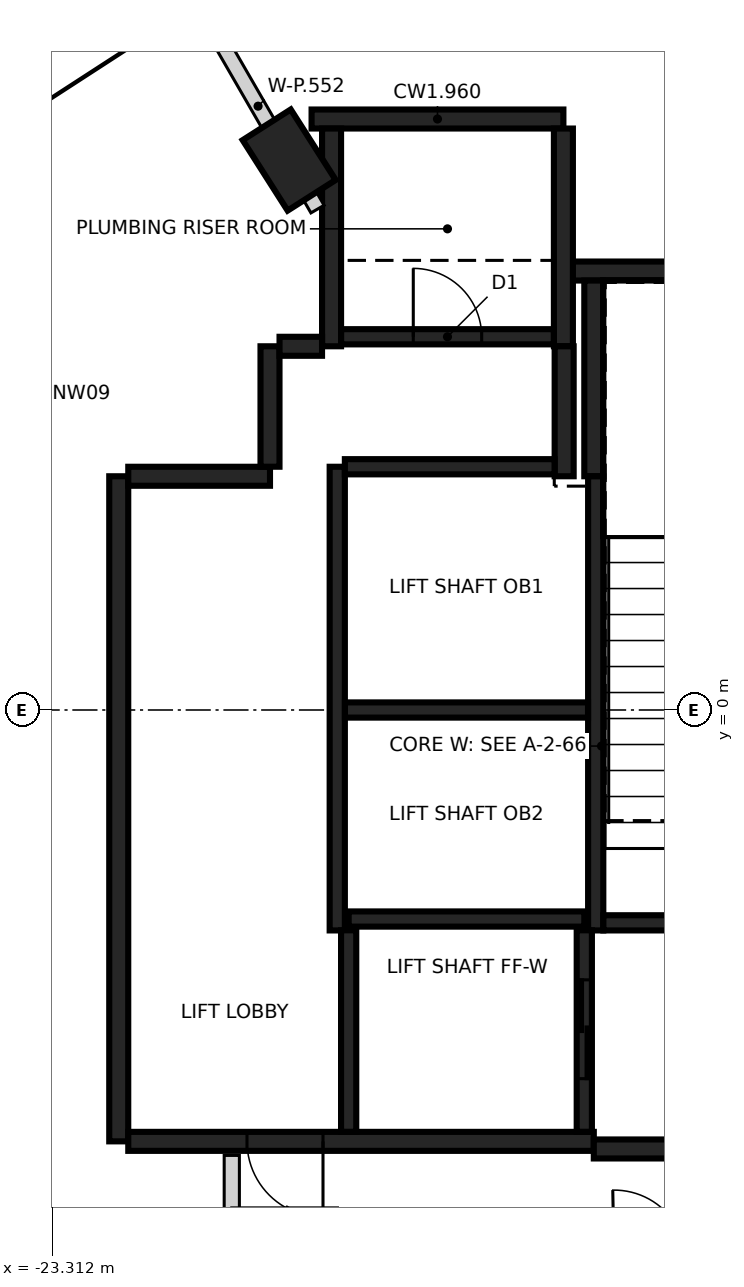
"""IFC4 building model, lengths in metres.
Left out: names, types, materials, properties, quantities, classifications, styles, units other than length and angle.
Written with IfcOpenShell. Run it as: python <this file> out.ifc"""

import sys

from ifc_helpers import new_model, si_unit, direction, frame, frame_2d, origin, origin_2d, place, context, subcontext, project, spatial, rectangle, extrude, element, fill, save


model = new_model("IFC4")
c1 = context("Model", 3, precision=1e-05, world=origin(), true_north=direction((0.0, 1.0)))
c2 = subcontext(c1, "Body", "Model", "MODEL_VIEW")
j1 = project(units=[si_unit("LENGTHUNIT", "METRE"), si_unit("PLANEANGLEUNIT", "RADIAN")], contexts=[c1])
p1 = place(None, origin())
s1 = spatial("IfcSite", under=j1, at=p1, CompositionType="ELEMENT")
p2 = place(p1, origin())
s2 = spatial("IfcBuilding", under=s1, at=p2, CompositionType="ELEMENT")
p3 = place(p2, frame((0.0, 0.0, 232.2)))
s3 = spatial("IfcBuildingStorey", under=s2, at=p3, CompositionType="ELEMENT", Elevation=232.2)
p4 = place(p3, frame((-20.195, 7.235, -0.35), z_axis=(0.0, 0.0, 1.0), x_axis=(-0.537585144719, 0.843209471114, 0.0)))
e1 = element("IfcColumn", 1, at=p4, inside=s3, PredefinedType="COLUMN", context=c2, shape_type="SweptSolid", body=[
    extrude(rectangle(XDim=1.1, YDim=0.75, at=origin_2d()), origin(), (0.0, 0.0, 1.0), 3.6),
])
p5 = place(p3, frame((-22.437, -5.675, 0.0), z_axis=(0.0, 0.0, 1.0), x_axis=(0.0, 1.0, 0.0)))
e2 = element("IfcWall", 2, at=p5, inside=s3, PredefinedType="SHEAR", context=c2, shape_type="SweptSolid", body=[
    extrude(rectangle(XDim=8.75, YDim=0.25, at=frame_2d((4.375, 0.0))), origin(), (0.0, 0.0, 1.0), 3.25),
])
p6 = place(p3, frame((-16.187, -5.675, 0.0), z_axis=(0.0, 0.0, 1.0), x_axis=(-1.0, 0.0, 0.0)))
e3 = element("IfcWall", 3, at=p6, inside=s3, PredefinedType="SHEAR", context=c2, shape_type="SweptSolid", body=[
    extrude(rectangle(XDim=6.125, YDim=0.25, at=frame_2d((3.062, 0.0))), origin(), (0.0, 0.0, 1.0), 3.25),
])
p7 = place(p6, frame((3.563, 0.0, 0.0)))
e4 = element("IfcOpeningElement", 4, at=p7, cuts=e3, PredefinedType="OPENING", context=c2, shape_type="SweptSolid", body=[
    extrude(rectangle(XDim=1.0, YDim=2.1, at=frame_2d((0.5, 1.05))), frame((0.0, 0.135, 0.0), z_axis=(0.0, -1.0, 0.0), x_axis=(1.0, 0.0, 0.0)), (0.0, 0.0, 1.0), 0.27),
])
p8 = place(p3, frame((-10.963, -5.775, 0.0), z_axis=(0.0, 0.0, 1.0), x_axis=(-1.0, 0.0, 0.0)))
e5 = element("IfcWall", 5, at=p8, inside=s3, PredefinedType="SHEAR", context=c2, shape_type="SweptSolid", body=[
    extrude(rectangle(XDim=5.225, YDim=0.25, at=frame_2d((2.612, 0.0))), origin(), (0.0, 0.0, 1.0), 3.25),
])
p9 = place(p3, frame((-16.472, 5.775, 0.0), z_axis=(0.0, 0.0, 1.0), x_axis=(1.0, 0.0, 0.0)))
e6 = element("IfcWall", 6, at=p9, inside=s3, PredefinedType="SHEAR", context=c2, shape_type="SweptSolid", body=[
    extrude(rectangle(XDim=5.51, YDim=0.25, at=frame_2d((2.755, 0.0))), origin(), (0.0, 0.0, 1.0), 3.25),
])
p10 = place(p3, frame((-19.9, 7.775, 0.0), z_axis=(0.0, 0.0, 1.0), x_axis=(1.0, 0.0, 0.0)))
e7 = element("IfcWall", 7, at=p10, inside=s3, PredefinedType="SHEAR", context=c2, shape_type="SweptSolid", body=[
    extrude(rectangle(XDim=3.313, YDim=0.25, at=frame_2d((1.656, 0.0))), origin(), (0.0, 0.0, 1.0), 3.25),
])
for number, where, z_axis, x_axis in (
    (8, (-16.587, 7.65, 0.0), (0.0, 0.0, 1.0), (0.0, -1.0, 0.0)),
    (9, (-19.637, 4.785, 0.0), (0.0, 0.0, 1.0), (0.0, 1.0, 0.0)),
):
    element("IfcWall", number, at=place(p3, frame(where, z_axis=z_axis, x_axis=x_axis)), inside=s3, PredefinedType="SHEAR", context=c2, shape_type="SweptSolid", body=[
        extrude(rectangle(XDim=2.865, YDim=0.25, at=frame_2d((1.432, 0.0))), origin(), (0.0, 0.0, 1.0), 3.25),
    ])
p11 = place(p3, frame((-16.187, 3.075, 0.0), z_axis=(0.0, 0.0, 1.0), x_axis=(0.0, 1.0, 0.0)))
e10 = element("IfcWall", 10, at=p11, inside=s3, PredefinedType="SHEAR", context=c2, shape_type="SweptSolid", body=[
    extrude(rectangle(XDim=2.575, YDim=0.25, at=frame_2d((1.287, 0.0))), origin(), (0.0, 0.0, 1.0), 3.25),
])
p12 = place(p3, frame((-22.312, 3.075, 0.0), z_axis=(0.0, 0.0, 1.0), x_axis=(1.0, 0.0, 0.0)))
e11 = element("IfcWall", 11, at=p12, inside=s3, PredefinedType="SHEAR", context=c2, shape_type="SweptSolid", body=[
    extrude(rectangle(XDim=1.865, YDim=0.25, at=frame_2d((0.932, 0.0))), origin(), (0.0, 0.0, 1.0), 3.25),
])
p13 = place(p3, frame((-16.577, 4.785, 0.0), z_axis=(0.0, 0.0, 1.0), x_axis=(0.0, -1.0, 0.0)))
e12 = element("IfcWall", 12, at=p13, inside=s3, PredefinedType="SHEAR", context=c2, shape_type="SweptSolid", body=[
    extrude(rectangle(XDim=1.71, YDim=0.25, at=frame_2d((0.855, 0.0))), origin(), (0.0, 0.0, 1.0), 3.25),
])
p14 = place(p3, frame((-20.447, 3.2, 0.0), z_axis=(0.0, 0.0, 1.0), x_axis=(0.0, 1.0, 0.0)))
e13 = element("IfcWall", 13, at=p14, inside=s3, PredefinedType="SHEAR", context=c2, shape_type="SweptSolid", body=[
    extrude(rectangle(XDim=1.584, YDim=0.25, at=frame_2d((0.792, 0.0))), origin(), (0.0, 0.0, 1.0), 3.25),
])
p15 = place(p3, frame((-20.322, 4.785, 0.0), z_axis=(0.0, 0.0, 1.0), x_axis=(1.0, 0.0, 0.0)))
e14 = element("IfcWall", 14, at=p15, inside=s3, PredefinedType="SHEAR", context=c2, shape_type="SweptSolid", body=[
    extrude(rectangle(XDim=0.559, YDim=0.25, at=frame_2d((0.28, 0.0))), origin(), (0.0, 0.0, 1.0), 3.25),
])
p16 = place(p3, frame((-16.162, 3.074, 0.0), z_axis=(0.0, 0.0, 1.0), x_axis=(0.0, -1.0, 0.0)))
e15 = element("IfcWall", 15, at=p16, inside=s3, PredefinedType="SHEAR", context=c2, shape_type="SweptSolid", body=[
    extrude(rectangle(XDim=5.974, YDim=0.2, at=frame_2d((2.987, 0.0))), origin(), (0.0, 0.0, 1.0), 3.25),
])
p17 = place(p3, frame((-19.562, -2.9, 0.0), z_axis=(0.0, 0.0, 1.0), x_axis=(0.0, 1.0, 0.0)))
e16 = element("IfcWall", 16, at=p17, inside=s3, PredefinedType="SHEAR", context=c2, shape_type="SweptSolid", body=[
    extrude(rectangle(XDim=6.1, YDim=0.2, at=frame_2d((3.05, 0.0))), origin(), (0.0, 0.0, 1.0), 3.25),
])
p18 = place(p3, frame((-10.963, -2.8, 0.0), z_axis=(0.0, 0.0, 1.0), x_axis=(-1.0, 0.0, 0.0)))
e17 = element("IfcWall", 17, at=p18, inside=s3, PredefinedType="SHEAR", context=c2, shape_type="SweptSolid", body=[
    extrude(rectangle(XDim=5.098, YDim=0.2, at=frame_2d((2.549, 0.0))), origin(), (0.0, 0.0, 1.0), 3.25),
])
p19 = place(p18, frame((1.774, 0.0, 0.0)))
e18 = element("IfcOpeningElement", 18, at=p19, cuts=e17, PredefinedType="OPENING", context=c2, shape_type="SweptSolid", body=[
    extrude(rectangle(XDim=1.4, YDim=2.1, at=frame_2d((0.7, 1.05))), frame((0.0, 0.11, 0.0), z_axis=(0.0, -1.0, 0.0), x_axis=(1.0, 0.0, 0.0)), (0.0, 0.0, 1.0), 0.22),
])
p20 = place(p3, frame((-16.263, 0.0, 0.0), z_axis=(0.0, 0.0, 1.0), x_axis=(-1.0, 0.0, 0.0)))
e19 = element("IfcWall", 19, at=p20, inside=s3, PredefinedType="SHEAR", context=c2, shape_type="SweptSolid", body=[
    extrude(rectangle(XDim=3.198, YDim=0.2, at=frame_2d((1.599, 0.0))), origin(), (0.0, 0.0, 1.0), 3.25),
])
p21 = place(p3, frame((-19.511, 4.91, 0.0), z_axis=(0.0, 0.0, 1.0), x_axis=(1.0, 0.0, 0.0)))
e20 = element("IfcWall", 20, at=p21, inside=s3, PredefinedType="SHEAR", context=c2, shape_type="SweptSolid", body=[
    extrude(rectangle(XDim=2.798, YDim=0.2, at=frame_2d((1.399, 0.0))), origin(), (0.0, 0.0, 1.0), 3.25),
])
p22 = place(p21, frame((0.949, 0.0, 0.0)))
e21 = element("IfcOpeningElement", 21, at=p22, cuts=e20, PredefinedType="OPENING", context=c2, shape_type="SweptSolid", body=[
    extrude(rectangle(XDim=0.9, YDim=2.1, at=frame_2d((0.45, 1.05))), frame((0.0, 0.11, 0.0), z_axis=(0.0, -1.0, 0.0), x_axis=(1.0, 0.0, 0.0)), (0.0, 0.0, 1.0), 0.22),
])
p23 = place(p3, frame((-19.462, 3.2, 0.0), z_axis=(0.0, 0.0, 1.0), x_axis=(1.0, 0.0, 0.0)))
e22 = element("IfcWall", 22, at=p23, inside=s3, PredefinedType="SHEAR", context=c2, shape_type="SweptSolid", body=[
    extrude(rectangle(XDim=2.759, YDim=0.2, at=frame_2d((1.379, 0.0))), origin(), (0.0, 0.0, 1.0), 3.25),
])
p24 = place(p3, frame((-19.412, -2.75, 0.0), z_axis=(0.0, 0.0, 1.0), x_axis=(1.0, 0.0, 0.0)))
e23 = element("IfcWall", 23, at=p24, inside=s3, PredefinedType="SHEAR", context=c2, shape_type="SweptSolid", body=[
    extrude(rectangle(XDim=3.1, YDim=0.2, at=frame_2d((1.55, 0.0))), origin(), (0.0, 0.0, 1.0), 3.25),
])
p25 = place(p3, frame((-16.312, -2.898, 0.0), z_axis=(0.0, 0.0, 1.0), x_axis=(0.0, -1.0, 0.0)))
e24 = element("IfcWall", 24, at=p25, inside=s3, PredefinedType="SHEAR", context=c2, shape_type="SweptSolid", body=[
    extrude(rectangle(XDim=2.651, YDim=0.2, at=frame_2d((1.325, 0.0))), origin(), (0.0, 0.0, 1.0), 3.25),
])
p26 = place(p25, frame((0.652, 0.0, 0.0)))
e25 = element("IfcOpeningElement", 25, at=p26, cuts=e24, PredefinedType="OPENING", context=c2, shape_type="SweptSolid", body=[
    extrude(rectangle(XDim=1.3, YDim=2.1, at=frame_2d((0.65, 1.05))), frame((0.0, 0.11, 0.0), z_axis=(0.0, -1.0, 0.0), x_axis=(1.0, 0.0, 0.0)), (0.0, 0.0, 1.0), 0.22),
])
p27 = place(p3, frame((-19.412, -5.549, 0.0), z_axis=(0.0, 0.0, 1.0), x_axis=(0.0, 1.0, 0.0)))
e26 = element("IfcWall", 26, at=p27, inside=s3, PredefinedType="SHEAR", context=c2, shape_type="SweptSolid", body=[
    extrude(rectangle(XDim=2.651, YDim=0.2, at=frame_2d((1.325, 0.0))), origin(), (0.0, 0.0, 1.0), 3.25),
])
p28 = place(p3, frame((-20.95, -6.65, 0.0), z_axis=(0.0, 0.0, 1.0), x_axis=(0.0, 1.0, 0.0)))
e27 = element("IfcWall", 27, at=p28, inside=s3, PredefinedType="PARTITIONING", context=c2, shape_type="SweptSolid", body=[
    extrude(rectangle(XDim=0.79, YDim=0.2, at=frame_2d((0.395, 0.0))), origin(), (0.0, 0.0, 1.0), 2.35),
])
p29 = place(p3, frame((-20.95, -6.65, 0.0), z_axis=(0.0, 0.0, 1.0), x_axis=(1.0, 0.0, 0.0)))
e28 = element("IfcWall", 28, at=p29, inside=s3, PredefinedType="PARTITIONING", context=c2, shape_type="SweptSolid", body=[
    extrude(rectangle(XDim=1.39, YDim=0.2, at=frame_2d((0.695, 0.0))), origin(), (0.0, 0.0, 1.0), 2.35),
])
p30 = place(p3, frame((-21.386, 9.298, 0.0), z_axis=(0.0, 0.0, 1.0), x_axis=(0.500017489778, -0.866015305821, 0.0)))
e29 = element("IfcWall", 29, at=p30, inside=s3, PredefinedType="PARTITIONING", context=c2, shape_type="SweptSolid", body=[
    extrude(rectangle(XDim=3.128, YDim=0.2, at=frame_2d((1.564, 0.0))), origin(), (0.0, 0.0, 1.0), 3.25),
])
p31 = place(p26, origin())
e30 = element("IfcDoor", 30, at=p31, inside=s3, OperationType="SLIDING_TO_RIGHT", PredefinedType="DOOR", context=c2, shape_type="SweptSolid", body=[
    extrude(rectangle(XDim=1.3, YDim=2.1, at=frame_2d((0.65, 1.05))), frame((0.0, 0.025, 0.0), z_axis=(0.0, -1.0, 0.0), x_axis=(1.0, 0.0, 0.0)), (0.0, 0.0, 1.0), 0.05),
])
fill(e25, e30)
p32 = place(p7, origin())
e31 = element("IfcDoor", 31, at=p32, inside=s3, OperationType="SINGLE_SWING_LEFT", PredefinedType="DOOR", context=c2, shape_type="SweptSolid", body=[
    extrude(rectangle(XDim=1.0, YDim=2.1, at=frame_2d((0.5, 1.05))), frame((0.0, 0.025, 0.0), z_axis=(0.0, -1.0, 0.0), x_axis=(1.0, 0.0, 0.0)), (0.0, 0.0, 1.0), 0.05),
])
fill(e4, e31)
p33 = place(p22, origin())
e32 = element("IfcDoor", 32, at=p33, inside=s3, OperationType="SINGLE_SWING_LEFT", PredefinedType="DOOR", context=c2, shape_type="SweptSolid", body=[
    extrude(rectangle(XDim=0.9, YDim=2.1, at=frame_2d((0.45, 1.05))), frame((0.0, 0.025, 0.0), z_axis=(0.0, -1.0, 0.0), x_axis=(1.0, 0.0, 0.0)), (0.0, 0.0, 1.0), 0.05),
])
fill(e21, e32)
save(model, sys.argv[1])
